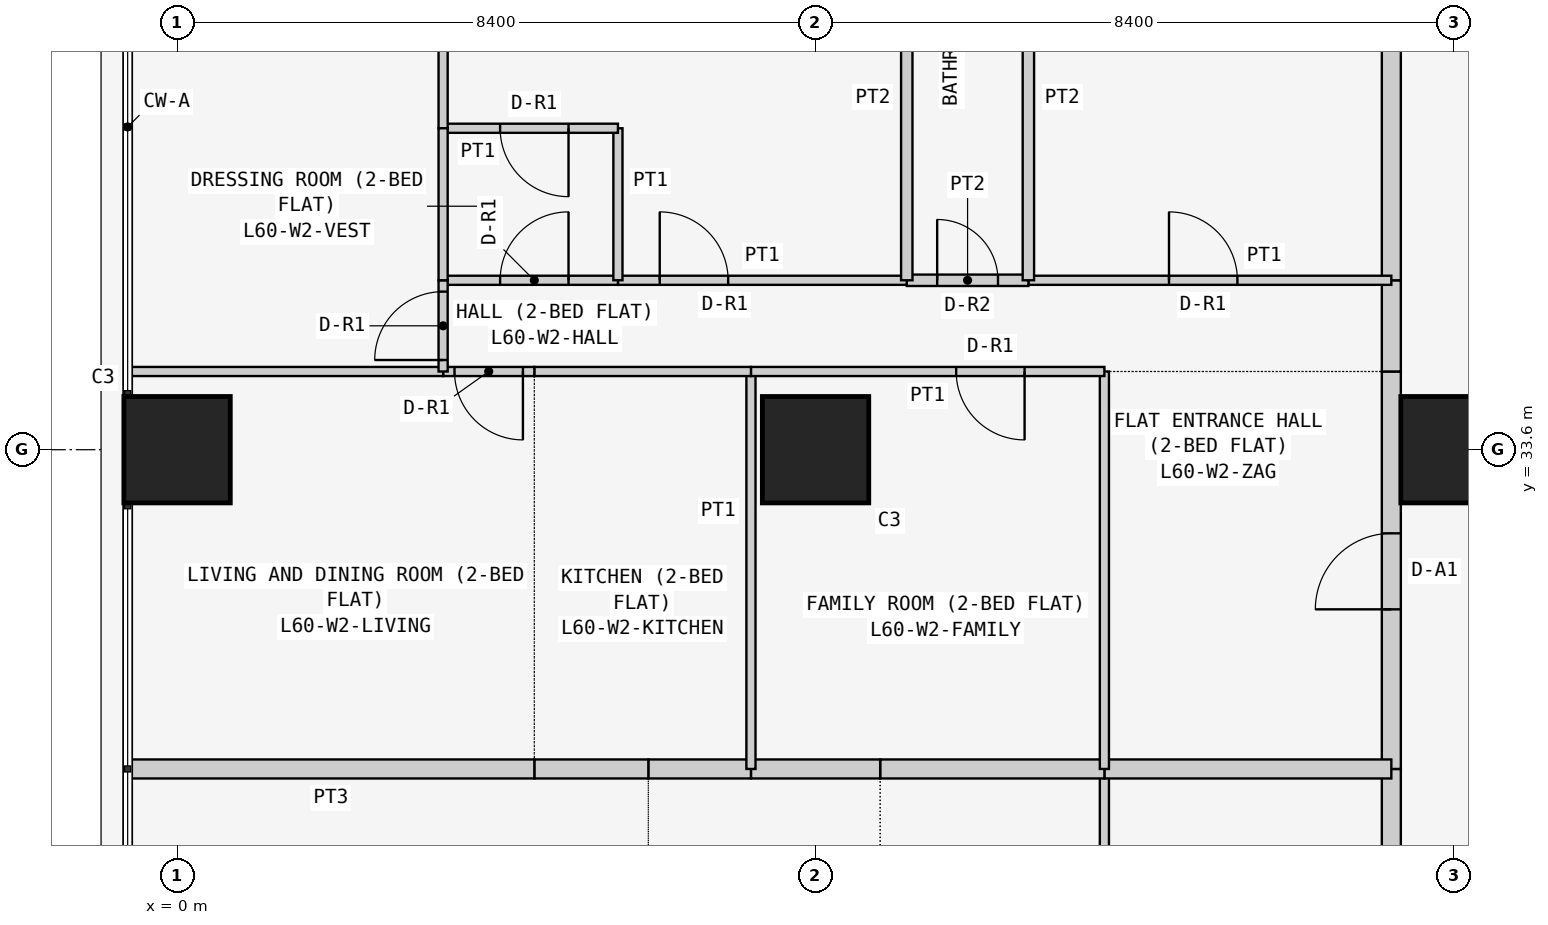
"""IFC4 building model, lengths in metres.
Left out: names, types, materials, properties, quantities, classifications, styles, units other than length and angle.
Written with IfcOpenShell. Run it as: python <this file> out.ifc"""

import sys

from ifc_helpers import new_model, si_unit, direction, frame, frame_2d, origin, origin_2d, place, context, subcontext, project, spatial, rectangle, extrude, element, fill, save


model = new_model("IFC4")
c1 = context("Model", 3, precision=1e-05, world=origin(), true_north=direction((0.0, 1.0)))
c2 = subcontext(c1, "Body", "Model", "MODEL_VIEW")
j1 = project(units=[si_unit("LENGTHUNIT", "METRE"), si_unit("PLANEANGLEUNIT", "RADIAN")], contexts=[c1])
p1 = place(None, origin())
s1 = spatial("IfcSite", under=j1, at=p1, CompositionType="ELEMENT")
p2 = place(p1, origin())
s2 = spatial("IfcBuilding", under=s1, at=p2, CompositionType="ELEMENT")
p3 = place(p2, frame((0.0, 0.0, 230.1)))
s3 = spatial("IfcBuildingStorey", under=s2, at=p3, CompositionType="ELEMENT", Elevation=230.1)
for number, where, z_axis, x_axis in (
    (1, (0.0, 33.6, 0.0), (0.0, 0.0, 1.0), (1.0, 0.0, 0.0)),
    (2, (8.4, 33.6, 0.0), (0.0, 0.0, 1.0), (1.0, 0.0, 0.0)),
    (3, (16.8, 33.6, 0.0), (0.0, 0.0, 1.0), (1.0, 0.0, 0.0)),
):
    element("IfcColumn", number, at=place(p3, frame(where, z_axis=z_axis, x_axis=x_axis)), inside=s3, PredefinedType="COLUMN", context=c2, shape_type="SweptSolid", body=[
        extrude(rectangle(XDim=1.4, YDim=1.4, at=origin_2d()), origin(), (0.0, 0.0, 1.0), 3.6),
    ])
p4 = place(p3, frame((15.975, 24.171, 0.0), z_axis=(0.0, 0.0, 1.0), x_axis=(0.0, 1.0, 0.0)))
e4 = element("IfcWall", 4, at=p4, inside=s3, PredefinedType="PARTITIONING", context=c2, shape_type="SweptSolid", body=[
    extrude(rectangle(XDim=5.229, YDim=0.25, at=frame_2d((2.615, 0.0))), origin(), (0.0, 0.0, 1.0), 3.45),
])
p5 = place(p4, frame((2.129, 0.0, 0.0)))
e5 = element("IfcOpeningElement", 5, at=p5, cuts=e4, PredefinedType="OPENING", context=c2, shape_type="SweptSolid", body=[
    extrude(rectangle(XDim=1.0, YDim=2.1, at=frame_2d((0.5, 1.05))), frame((0.0, 0.135, 0.0), z_axis=(0.0, -1.0, 0.0), x_axis=(1.0, 0.0, 0.0)), (0.0, 0.0, 1.0), 0.27),
])
p6 = place(p3, frame((15.975, 29.4, 0.0), z_axis=(0.0, 0.0, 1.0), x_axis=(0.0, 1.0, 0.0)))
e6 = element("IfcWall", 6, at=p6, inside=s3, PredefinedType="PARTITIONING", context=c2, shape_type="SweptSolid", body=[
    extrude(rectangle(XDim=5.229, YDim=0.25, at=frame_2d((2.615, 0.0))), origin(), (0.0, 0.0, 1.0), 3.45),
])
p7 = place(p6, frame((2.1, 0.0, 0.0)))
e7 = element("IfcOpeningElement", 7, at=p7, cuts=e6, PredefinedType="OPENING", context=c2, shape_type="SweptSolid", body=[
    extrude(rectangle(XDim=1.0, YDim=2.1, at=frame_2d((0.5, 1.05))), frame((0.0, 0.135, 0.0), z_axis=(0.0, -1.0, 0.0), x_axis=(1.0, 0.0, 0.0)), (0.0, 0.0, 1.0), 0.27),
])
p8 = place(p3, frame((15.975, 34.629, 0.0), z_axis=(0.0, 0.0, 1.0), x_axis=(0.0, 1.0, 0.0)))
e8 = element("IfcWall", 8, at=p8, inside=s3, PredefinedType="PARTITIONING", context=c2, shape_type="SweptSolid", body=[
    extrude(rectangle(XDim=1.2, YDim=0.25, at=frame_2d((0.6, 0.0))), origin(), (0.0, 0.0, 1.0), 3.45),
])
p9 = place(p3, frame((15.975, 35.829, 0.0), z_axis=(0.0, 0.0, 1.0), x_axis=(0.0, 1.0, 0.0)))
e9 = element("IfcWall", 9, at=p9, inside=s3, PredefinedType="PARTITIONING", context=c2, shape_type="SweptSolid", body=[
    extrude(rectangle(XDim=6.871, YDim=0.25, at=frame_2d((3.436, 0.0))), origin(), (0.0, 0.0, 1.0), 3.45),
])
p10 = place(p3, frame((12.2, 29.4, 0.0), z_axis=(0.0, 0.0, 1.0), x_axis=(0.0, -1.0, 0.0)))
e10 = element("IfcWall", 10, at=p10, inside=s3, PredefinedType="PARTITIONING", context=c2, shape_type="SweptSolid", body=[
    extrude(rectangle(XDim=5.229, YDim=0.12, at=frame_2d((2.615, 0.0))), origin(), (0.0, 0.0, 1.0), 3.45),
])
p11 = place(p3, frame((15.975, 29.4, 0.0), z_axis=(0.0, 0.0, 1.0), x_axis=(-1.0, 0.0, 0.0)))
e11 = element("IfcWall", 11, at=p11, inside=s3, PredefinedType="PARTITIONING", context=c2, shape_type="SweptSolid", body=[
    extrude(rectangle(XDim=3.775, YDim=0.25, at=frame_2d((1.888, 0.0))), origin(), (0.0, 0.0, 1.0), 3.45),
])
p12 = place(p3, frame((12.2, 29.4, 0.0), z_axis=(0.0, 0.0, 1.0), x_axis=(-1.0, 0.0, 0.0)))
e12 = element("IfcWall", 12, at=p12, inside=s3, PredefinedType="PARTITIONING", context=c2, shape_type="SweptSolid", body=[
    extrude(rectangle(XDim=2.95, YDim=0.25, at=frame_2d((1.475, 0.0))), origin(), (0.0, 0.0, 1.0), 3.45),
])
p13 = place(p3, frame((9.25, 29.4, 0.0), z_axis=(0.0, 0.0, 1.0), x_axis=(-1.0, 0.0, 0.0)))
e13 = element("IfcWall", 13, at=p13, inside=s3, PredefinedType="PARTITIONING", context=c2, shape_type="SweptSolid", body=[
    extrude(rectangle(XDim=1.7, YDim=0.25, at=frame_2d((0.85, 0.0))), origin(), (0.0, 0.0, 1.0), 3.45),
])
p14 = place(p3, frame((7.55, 29.4, 0.0), z_axis=(0.0, 0.0, 1.0), x_axis=(-1.0, 0.0, 0.0)))
e14 = element("IfcWall", 14, at=p14, inside=s3, PredefinedType="PARTITIONING", context=c2, shape_type="SweptSolid", body=[
    extrude(rectangle(XDim=1.35, YDim=0.25, at=frame_2d((0.675, 0.0))), origin(), (0.0, 0.0, 1.0), 3.45),
])
p15 = place(p3, frame((6.2, 29.4, 0.0), z_axis=(0.0, 0.0, 1.0), x_axis=(-1.0, 0.0, 0.0)))
e15 = element("IfcWall", 15, at=p15, inside=s3, PredefinedType="PARTITIONING", context=c2, shape_type="SweptSolid", body=[
    extrude(rectangle(XDim=1.5, YDim=0.25, at=frame_2d((0.75, 0.0))), origin(), (0.0, 0.0, 1.0), 3.45),
])
p16 = place(p3, frame((4.7, 29.4, 0.0), z_axis=(0.0, 0.0, 1.0), x_axis=(-1.0, 0.0, 0.0)))
e16 = element("IfcWall", 16, at=p16, inside=s3, PredefinedType="PARTITIONING", context=c2, shape_type="SweptSolid", body=[
    extrude(rectangle(XDim=5.35, YDim=0.25, at=frame_2d((2.675, 0.0))), origin(), (0.0, 0.0, 1.0), 3.45),
])
for number, where, z_axis, x_axis in (
    (17, (12.2, 29.4, 0.0), (0.0, 0.0, 1.0), (0.0, 1.0, 0.0)),
    (18, (7.55, 29.4, 0.0), (0.0, 0.0, 1.0), (0.0, 1.0, 0.0)),
):
    element("IfcWall", number, at=place(p3, frame(where, z_axis=z_axis, x_axis=x_axis)), inside=s3, PredefinedType="PARTITIONING", context=c2, shape_type="SweptSolid", body=[
        extrude(rectangle(XDim=5.229, YDim=0.12, at=frame_2d((2.615, 0.0))), origin(), (0.0, 0.0, 1.0), 3.45),
    ])
p17 = place(p3, frame((7.55, 34.629, 0.0), z_axis=(0.0, 0.0, 1.0), x_axis=(1.0, 0.0, 0.0)))
e19 = element("IfcWall", 19, at=p17, inside=s3, PredefinedType="PARTITIONING", context=c2, shape_type="SweptSolid", body=[
    extrude(rectangle(XDim=4.65, YDim=0.12, at=frame_2d((2.325, 0.0))), origin(), (0.0, 0.0, 1.0), 3.45),
])
p18 = place(p17, frame((2.7, 0.0, 0.0)))
e20 = element("IfcOpeningElement", 20, at=p18, cuts=e19, PredefinedType="OPENING", context=c2, shape_type="SweptSolid", body=[
    extrude(rectangle(XDim=0.9, YDim=2.1, at=frame_2d((0.45, 1.05))), frame((0.0, 0.07, 0.0), z_axis=(0.0, -1.0, 0.0), x_axis=(1.0, 0.0, 0.0)), (0.0, 0.0, 1.0), 0.14),
])
p19 = place(p3, frame((4.7, 34.629, 0.0), z_axis=(0.0, 0.0, 1.0), x_axis=(1.0, 0.0, 0.0)))
e21 = element("IfcWall", 21, at=p19, inside=s3, PredefinedType="PARTITIONING", context=c2, shape_type="SweptSolid", body=[
    extrude(rectangle(XDim=2.85, YDim=0.12, at=frame_2d((1.425, 0.0))), origin(), (0.0, 0.0, 1.0), 3.45),
])
p20 = place(p3, frame((3.5, 34.629, 0.0), z_axis=(0.0, 0.0, 1.0), x_axis=(1.0, 0.0, 0.0)))
e22 = element("IfcWall", 22, at=p20, inside=s3, PredefinedType="PARTITIONING", context=c2, shape_type="SweptSolid", body=[
    extrude(rectangle(XDim=1.2, YDim=0.12, at=frame_2d((0.6, 0.0))), origin(), (0.0, 0.0, 1.0), 3.45),
])
p21 = place(p20, frame((0.15, 0.0, 0.0)))
e23 = element("IfcOpeningElement", 23, at=p21, cuts=e22, PredefinedType="OPENING", context=c2, shape_type="SweptSolid", body=[
    extrude(rectangle(XDim=0.9, YDim=2.1, at=frame_2d((0.45, 1.05))), frame((0.0, 0.07, 0.0), z_axis=(0.0, -1.0, 0.0), x_axis=(1.0, 0.0, 0.0)), (0.0, 0.0, 1.0), 0.14),
])
p22 = place(p3, frame((-0.65, 34.629, 0.0), z_axis=(0.0, 0.0, 1.0), x_axis=(1.0, 0.0, 0.0)))
e24 = element("IfcWall", 24, at=p22, inside=s3, PredefinedType="PARTITIONING", context=c2, shape_type="SweptSolid", body=[
    extrude(rectangle(XDim=4.15, YDim=0.12, at=frame_2d((2.075, 0.0))), origin(), (0.0, 0.0, 1.0), 3.45),
])
p23 = place(p3, frame((11.2, 35.829, 0.0), z_axis=(0.0, 0.0, 1.0), x_axis=(1.0, 0.0, 0.0)))
e25 = element("IfcWall", 25, at=p23, inside=s3, PredefinedType="PARTITIONING", context=c2, shape_type="SweptSolid", body=[
    extrude(rectangle(XDim=4.775, YDim=0.12, at=frame_2d((2.388, 0.0))), origin(), (0.0, 0.0, 1.0), 3.45),
])
p24 = place(p23, frame((1.85, 0.0, 0.0)))
e26 = element("IfcOpeningElement", 26, at=p24, cuts=e25, PredefinedType="OPENING", context=c2, shape_type="SweptSolid", body=[
    extrude(rectangle(XDim=0.9, YDim=2.1, at=frame_2d((0.45, 1.05))), frame((0.0, 0.07, 0.0), z_axis=(0.0, -1.0, 0.0), x_axis=(1.0, 0.0, 0.0)), (0.0, 0.0, 1.0), 0.14),
])
p25 = place(p3, frame((9.6, 35.829, 0.0), z_axis=(0.0, 0.0, 1.0), x_axis=(1.0, 0.0, 0.0)))
e27 = element("IfcWall", 27, at=p25, inside=s3, PredefinedType="PARTITIONING", context=c2, shape_type="SweptSolid", body=[
    extrude(rectangle(XDim=1.6, YDim=0.15, at=frame_2d((0.8, 0.0))), origin(), (0.0, 0.0, 1.0), 3.45),
])
p26 = place(p25, frame((0.4, 0.0, 0.0)))
e28 = element("IfcOpeningElement", 28, at=p26, cuts=e27, PredefinedType="OPENING", context=c2, shape_type="SweptSolid", body=[
    extrude(rectangle(XDim=0.8, YDim=2.1, at=frame_2d((0.4, 1.05))), frame((0.0, 0.085, 0.0), z_axis=(0.0, -1.0, 0.0), x_axis=(1.0, 0.0, 0.0)), (0.0, 0.0, 1.0), 0.17),
])
p27 = place(p3, frame((5.8, 35.829, 0.0), z_axis=(0.0, 0.0, 1.0), x_axis=(1.0, 0.0, 0.0)))
e29 = element("IfcWall", 29, at=p27, inside=s3, PredefinedType="PARTITIONING", context=c2, shape_type="SweptSolid", body=[
    extrude(rectangle(XDim=3.8, YDim=0.12, at=frame_2d((1.9, 0.0))), origin(), (0.0, 0.0, 1.0), 3.45),
])
p28 = place(p27, frame((0.55, 0.0, 0.0)))
e30 = element("IfcOpeningElement", 30, at=p28, cuts=e29, PredefinedType="OPENING", context=c2, shape_type="SweptSolid", body=[
    extrude(rectangle(XDim=0.9, YDim=2.1, at=frame_2d((0.45, 1.05))), frame((0.0, 0.07, 0.0), z_axis=(0.0, -1.0, 0.0), x_axis=(1.0, 0.0, 0.0)), (0.0, 0.0, 1.0), 0.14),
])
p29 = place(p3, frame((3.5, 35.829, 0.0), z_axis=(0.0, 0.0, 1.0), x_axis=(1.0, 0.0, 0.0)))
e31 = element("IfcWall", 31, at=p29, inside=s3, PredefinedType="PARTITIONING", context=c2, shape_type="SweptSolid", body=[
    extrude(rectangle(XDim=2.3, YDim=0.12, at=frame_2d((1.15, 0.0))), origin(), (0.0, 0.0, 1.0), 3.45),
])
p30 = place(p29, frame((0.75, 0.0, 0.0)))
e32 = element("IfcOpeningElement", 32, at=p30, cuts=e31, PredefinedType="OPENING", context=c2, shape_type="SweptSolid", body=[
    extrude(rectangle(XDim=0.9, YDim=2.1, at=frame_2d((0.45, 1.05))), frame((0.0, 0.07, 0.0), z_axis=(0.0, -1.0, 0.0), x_axis=(1.0, 0.0, 0.0)), (0.0, 0.0, 1.0), 0.14),
])
p31 = place(p3, frame((3.5, 34.629, 0.0), z_axis=(0.0, 0.0, 1.0), x_axis=(0.0, 1.0, 0.0)))
e33 = element("IfcWall", 33, at=p31, inside=s3, PredefinedType="PARTITIONING", context=c2, shape_type="SweptSolid", body=[
    extrude(rectangle(XDim=1.2, YDim=0.12, at=frame_2d((0.6, 0.0))), origin(), (0.0, 0.0, 1.0), 3.45),
])
p32 = place(p31, frame((0.151, 0.0, 0.0)))
e34 = element("IfcOpeningElement", 34, at=p32, cuts=e33, PredefinedType="OPENING", context=c2, shape_type="SweptSolid", body=[
    extrude(rectangle(XDim=0.9, YDim=2.1, at=frame_2d((0.45, 1.05))), frame((0.0, 0.07, 0.0), z_axis=(0.0, -1.0, 0.0), x_axis=(1.0, 0.0, 0.0)), (0.0, 0.0, 1.0), 0.14),
])
for number, where, z_axis, x_axis in (
    (35, (11.2, 35.829, 0.0), (0.0, 0.0, 1.0), (0.0, 1.0, 0.0)),
    (36, (9.6, 35.829, 0.0), (0.0, 0.0, 1.0), (0.0, 1.0, 0.0)),
):
    element("IfcWall", number, at=place(p3, frame(where, z_axis=z_axis, x_axis=x_axis)), inside=s3, PredefinedType="PARTITIONING", context=c2, shape_type="SweptSolid", body=[
        extrude(rectangle(XDim=6.871, YDim=0.15, at=frame_2d((3.436, 0.0))), origin(), (0.0, 0.0, 1.0), 3.45),
    ])
p33 = place(p3, frame((5.8, 35.829, 0.0), z_axis=(0.0, 0.0, 1.0), x_axis=(0.0, 1.0, 0.0)))
e37 = element("IfcWall", 37, at=p33, inside=s3, PredefinedType="PARTITIONING", context=c2, shape_type="SweptSolid", body=[
    extrude(rectangle(XDim=2.0, YDim=0.12, at=frame_2d((1.0, 0.0))), origin(), (0.0, 0.0, 1.0), 3.45),
])
p34 = place(p3, frame((5.8, 37.829, 0.0), z_axis=(0.0, 0.0, 1.0), x_axis=(-1.0, 0.0, 0.0)))
e38 = element("IfcWall", 38, at=p34, inside=s3, PredefinedType="PARTITIONING", context=c2, shape_type="SweptSolid", body=[
    extrude(rectangle(XDim=2.3, YDim=0.12, at=frame_2d((1.15, 0.0))), origin(), (0.0, 0.0, 1.0), 3.45),
])
p35 = place(p34, frame((0.65, 0.0, 0.0)))
e39 = element("IfcOpeningElement", 39, at=p35, cuts=e38, PredefinedType="OPENING", context=c2, shape_type="SweptSolid", body=[
    extrude(rectangle(XDim=0.9, YDim=2.1, at=frame_2d((0.45, 1.05))), frame((0.0, 0.07, 0.0), z_axis=(0.0, -1.0, 0.0), x_axis=(1.0, 0.0, 0.0)), (0.0, 0.0, 1.0), 0.14),
])
p36 = place(p3, frame((3.5, 37.829, 0.0), z_axis=(0.0, 0.0, 1.0), x_axis=(0.0, 1.0, 0.0)))
e40 = element("IfcWall", 40, at=p36, inside=s3, PredefinedType="PARTITIONING", context=c2, shape_type="SweptSolid", body=[
    extrude(rectangle(XDim=4.871, YDim=0.12, at=frame_2d((2.436, 0.0))), origin(), (0.0, 0.0, 1.0), 3.45),
])
p37 = place(p3, frame((3.5, 35.829, 0.0), z_axis=(0.0, 0.0, 1.0), x_axis=(0.0, 1.0, 0.0)))
e41 = element("IfcWall", 41, at=p37, inside=s3, PredefinedType="PARTITIONING", context=c2, shape_type="SweptSolid", body=[
    extrude(rectangle(XDim=2.0, YDim=0.12, at=frame_2d((1.0, 0.0))), origin(), (0.0, 0.0, 1.0), 3.45),
])
p38 = place(p7, origin())
e42 = element("IfcDoor", 42, at=p38, inside=s3, OperationType="SINGLE_SWING_LEFT", PredefinedType="DOOR", context=c2, shape_type="SweptSolid", body=[
    extrude(rectangle(XDim=1.0, YDim=2.1, at=frame_2d((0.5, 1.05))), frame((0.0, 0.025, 0.0), z_axis=(0.0, -1.0, 0.0), x_axis=(1.0, 0.0, 0.0)), (0.0, 0.0, 1.0), 0.05),
])
fill(e7, e42)
p39 = place(p18, frame((0.9, 0.0, 0.0), z_axis=(0.0, 0.0, 1.0), x_axis=(-1.0, 0.0, 0.0)))
e43 = element("IfcDoor", 43, at=p39, inside=s3, OperationType="SINGLE_SWING_LEFT", PredefinedType="DOOR", context=c2, shape_type="SweptSolid", body=[
    extrude(rectangle(XDim=0.9, YDim=2.1, at=frame_2d((0.45, 1.05))), frame((0.0, 0.025, 0.0), z_axis=(0.0, -1.0, 0.0), x_axis=(1.0, 0.0, 0.0)), (0.0, 0.0, 1.0), 0.05),
])
fill(e20, e43)
p40 = place(p21, frame((0.9, 0.0, 0.0), z_axis=(0.0, 0.0, 1.0), x_axis=(-1.0, 0.0, 0.0)))
e44 = element("IfcDoor", 44, at=p40, inside=s3, OperationType="SINGLE_SWING_LEFT", PredefinedType="DOOR", context=c2, shape_type="SweptSolid", body=[
    extrude(rectangle(XDim=0.9, YDim=2.1, at=frame_2d((0.45, 1.05))), frame((0.0, 0.025, 0.0), z_axis=(0.0, -1.0, 0.0), x_axis=(1.0, 0.0, 0.0)), (0.0, 0.0, 1.0), 0.05),
])
fill(e23, e44)
p41 = place(p24, origin())
e45 = element("IfcDoor", 45, at=p41, inside=s3, OperationType="SINGLE_SWING_LEFT", PredefinedType="DOOR", context=c2, shape_type="SweptSolid", body=[
    extrude(rectangle(XDim=0.9, YDim=2.1, at=frame_2d((0.45, 1.05))), frame((0.0, 0.025, 0.0), z_axis=(0.0, -1.0, 0.0), x_axis=(1.0, 0.0, 0.0)), (0.0, 0.0, 1.0), 0.05),
])
fill(e26, e45)
p42 = place(p26, origin())
e46 = element("IfcDoor", 46, at=p42, inside=s3, OperationType="SINGLE_SWING_LEFT", PredefinedType="DOOR", context=c2, shape_type="SweptSolid", body=[
    extrude(rectangle(XDim=0.8, YDim=2.1, at=frame_2d((0.4, 1.05))), frame((0.0, 0.025, 0.0), z_axis=(0.0, -1.0, 0.0), x_axis=(1.0, 0.0, 0.0)), (0.0, 0.0, 1.0), 0.05),
])
fill(e28, e46)
p43 = place(p28, origin())
e47 = element("IfcDoor", 47, at=p43, inside=s3, OperationType="SINGLE_SWING_LEFT", PredefinedType="DOOR", context=c2, shape_type="SweptSolid", body=[
    extrude(rectangle(XDim=0.9, YDim=2.1, at=frame_2d((0.45, 1.05))), frame((0.0, 0.025, 0.0), z_axis=(0.0, -1.0, 0.0), x_axis=(1.0, 0.0, 0.0)), (0.0, 0.0, 1.0), 0.05),
])
fill(e30, e47)
p44 = place(p30, origin())
e48 = element("IfcDoor", 48, at=p44, inside=s3, OperationType="SINGLE_SWING_RIGHT", PredefinedType="DOOR", context=c2, shape_type="SweptSolid", body=[
    extrude(rectangle(XDim=0.9, YDim=2.1, at=frame_2d((0.45, 1.05))), frame((0.0, 0.025, 0.0), z_axis=(0.0, -1.0, 0.0), x_axis=(1.0, 0.0, 0.0)), (0.0, 0.0, 1.0), 0.05),
])
fill(e32, e48)
p45 = place(p35, origin())
e49 = element("IfcDoor", 49, at=p45, inside=s3, OperationType="SINGLE_SWING_LEFT", PredefinedType="DOOR", context=c2, shape_type="SweptSolid", body=[
    extrude(rectangle(XDim=0.9, YDim=2.1, at=frame_2d((0.45, 1.05))), frame((0.0, 0.025, 0.0), z_axis=(0.0, -1.0, 0.0), x_axis=(1.0, 0.0, 0.0)), (0.0, 0.0, 1.0), 0.05),
])
fill(e39, e49)
p46 = place(p32, origin())
e50 = element("IfcDoor", 50, at=p46, inside=s3, OperationType="SINGLE_SWING_LEFT", PredefinedType="DOOR", context=c2, shape_type="SweptSolid", body=[
    extrude(rectangle(XDim=0.9, YDim=2.1, at=frame_2d((0.45, 1.05))), frame((0.0, 0.025, 0.0), z_axis=(0.0, -1.0, 0.0), x_axis=(1.0, 0.0, 0.0)), (0.0, 0.0, 1.0), 0.05),
])
fill(e34, e50)
save(model, sys.argv[1])
